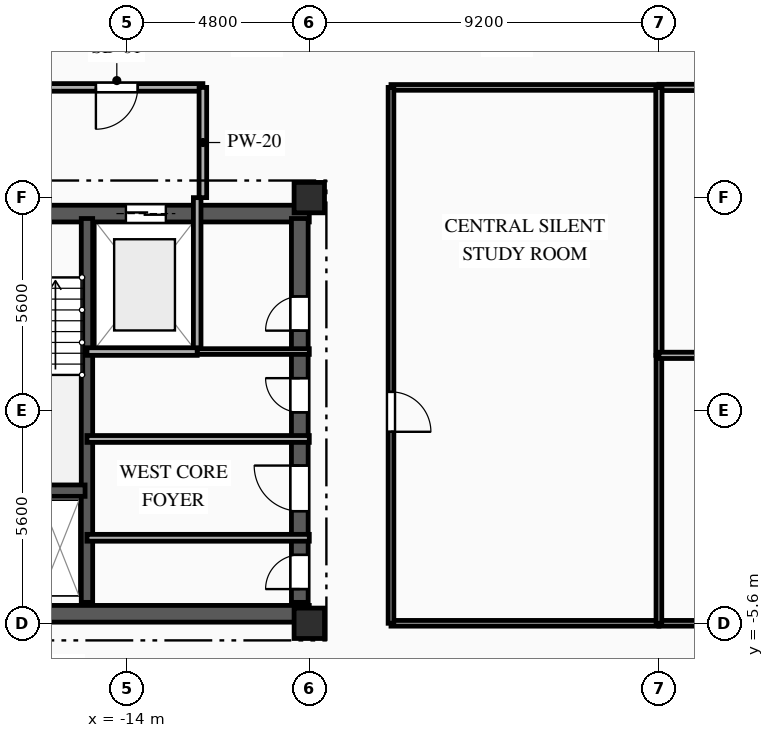
"""IFC4 building model, lengths in metres.
Left out: names, types, materials, properties, quantities, classifications, styles, units other than length and angle.
Written with IfcOpenShell. Run it as: python <this file> out.ifc"""

import sys

from ifc_helpers import new_model, si_unit, direction, frame, frame_2d, origin, origin_2d, place, context, subcontext, project, spatial, rectangle, extrude, element, fill, save


model = new_model("IFC4")
c1 = context("Model", 3, precision=1e-05, world=origin(), true_north=direction((0.0, 1.0)))
c2 = subcontext(c1, "Body", "Model", "MODEL_VIEW")
j1 = project(units=[si_unit("LENGTHUNIT", "METRE"), si_unit("PLANEANGLEUNIT", "RADIAN")], contexts=[c1])
p1 = place(None, origin())
s1 = spatial("IfcSite", under=j1, at=p1, CompositionType="ELEMENT")
p2 = place(p1, origin())
s2 = spatial("IfcBuilding", under=s1, at=p2, CompositionType="ELEMENT")
p3 = place(p2, frame((0.0, 0.0, 241.7)))
s3 = spatial("IfcBuildingStorey", under=s2, at=p3, CompositionType="ELEMENT", Elevation=241.7)
for number, where, z_axis, x_axis in (
    (1, (-9.2, -5.6, 0.0), (0.0, 0.0, 1.0), (1.0, 0.0, 0.0)),
    (2, (-9.2, 5.6, 0.0), (0.0, 0.0, 1.0), (1.0, 0.0, 0.0)),
):
    element("IfcColumn", number, at=place(p3, frame(where, z_axis=z_axis, x_axis=x_axis)), inside=s3, PredefinedType="COLUMN", context=c2, shape_type="SweptSolid", body=[
        extrude(rectangle(XDim=0.8, YDim=0.8, at=origin_2d()), origin(), (0.0, 0.0, 1.0), 3.35),
    ])
p4 = place(p3, frame((-18.8, 5.18, 0.0), z_axis=(0.0, 0.0, 1.0), x_axis=(1.0, 0.0, 0.0)))
e3 = element("IfcWall", 3, at=p4, inside=s3, PredefinedType="SHEAR", context=c2, shape_type="SweptSolid", body=[
    extrude(rectangle(XDim=9.6, YDim=0.44, at=frame_2d((4.8, 0.0))), origin(), (0.0, 0.0, 1.0), 3.04),
])
p5 = place(p4, frame((1.55, 0.0, 0.0)))
e4 = element("IfcOpeningElement", 4, at=p5, cuts=e3, PredefinedType="OPENING", context=c2, shape_type="SweptSolid", body=[
    extrude(rectangle(XDim=1.1, YDim=2.15, at=frame_2d((0.55, 1.075))), frame((0.0, 0.23, 0.0), z_axis=(0.0, -1.0, 0.0), x_axis=(1.0, 0.0, 0.0)), (0.0, 0.0, 1.0), 0.46),
])
p6 = place(p4, frame((4.775, 0.0, 0.0)))
e5 = element("IfcOpeningElement", 5, at=p6, cuts=e3, PredefinedType="OPENING", context=c2, shape_type="SweptSolid", body=[
    extrude(rectangle(XDim=1.05, YDim=2.1, at=frame_2d((0.525, 1.05))), frame((0.0, 0.23, 0.0), z_axis=(0.0, -1.0, 0.0), x_axis=(1.0, 0.0, 0.0)), (0.0, 0.0, 1.0), 0.46),
])
p7 = place(p3, frame((-18.8, -5.35, 0.0), z_axis=(0.0, 0.0, 1.0), x_axis=(1.0, 0.0, 0.0)))
e6 = element("IfcWall", 6, at=p7, inside=s3, PredefinedType="SHEAR", context=c2, shape_type="SweptSolid", body=[
    extrude(rectangle(XDim=9.6, YDim=0.44, at=frame_2d((4.8, 0.0))), origin(), (0.0, 0.0, 1.0), 3.04),
])
p8 = place(p7, frame((1.05, 0.0, 0.0)))
e7 = element("IfcOpeningElement", 7, at=p8, cuts=e6, PredefinedType="OPENING", context=c2, shape_type="SweptSolid", body=[
    extrude(rectangle(XDim=0.9, YDim=2.1, at=frame_2d((0.45, 1.05))), frame((0.0, 0.23, 0.0), z_axis=(0.0, -1.0, 0.0), x_axis=(1.0, 0.0, 0.0)), (0.0, 0.0, 1.0), 0.46),
])
p9 = place(p3, frame((-9.45, -5.05, 0.0), z_axis=(0.0, 0.0, 1.0), x_axis=(0.0, 1.0, 0.0)))
e8 = element("IfcWall", 8, at=p9, inside=s3, PredefinedType="SHEAR", context=c2, shape_type="SweptSolid", body=[
    extrude(rectangle(XDim=10.1, YDim=0.44, at=frame_2d((5.05, 0.0))), origin(), (0.0, 0.0, 1.0), 3.04),
])
p10 = place(p9, frame((7.15, 0.0, 0.0)))
e9 = element("IfcOpeningElement", 9, at=p10, cuts=e8, PredefinedType="OPENING", context=c2, shape_type="SweptSolid", body=[
    extrude(rectangle(XDim=0.9, YDim=2.1, at=frame_2d((0.45, 1.05))), frame((0.0, 0.23, 0.0), z_axis=(0.0, -1.0, 0.0), x_axis=(1.0, 0.0, 0.0)), (0.0, 0.0, 1.0), 0.46),
])
p11 = place(p9, frame((2.4, 0.0, 0.0)))
e10 = element("IfcOpeningElement", 10, at=p11, cuts=e8, PredefinedType="OPENING", context=c2, shape_type="SweptSolid", body=[
    extrude(rectangle(XDim=1.2, YDim=2.15, at=frame_2d((0.6, 1.075))), frame((0.0, 0.23, 0.0), z_axis=(0.0, -1.0, 0.0), x_axis=(1.0, 0.0, 0.0)), (0.0, 0.0, 1.0), 0.46),
])
p12 = place(p9, frame((0.35, 0.0, 0.0)))
e11 = element("IfcOpeningElement", 11, at=p12, cuts=e8, PredefinedType="OPENING", context=c2, shape_type="SweptSolid", body=[
    extrude(rectangle(XDim=0.9, YDim=2.1, at=frame_2d((0.45, 1.05))), frame((0.0, 0.23, 0.0), z_axis=(0.0, -1.0, 0.0), x_axis=(1.0, 0.0, 0.0)), (0.0, 0.0, 1.0), 0.46),
])
p13 = place(p9, frame((5.0, 0.0, 0.0)))
e12 = element("IfcOpeningElement", 12, at=p13, cuts=e8, PredefinedType="OPENING", context=c2, shape_type="SweptSolid", body=[
    extrude(rectangle(XDim=0.9, YDim=2.1, at=frame_2d((0.45, 1.05))), frame((0.0, 0.23, 0.0), z_axis=(0.0, -1.0, 0.0), x_axis=(1.0, 0.0, 0.0)), (0.0, 0.0, 1.0), 0.46),
])
p14 = place(p3, frame((-15.05, -5.05, 0.0), z_axis=(0.0, 0.0, 1.0), x_axis=(0.0, 1.0, 0.0)))
e13 = element("IfcWall", 13, at=p14, inside=s3, PredefinedType="SHEAR", context=c2, shape_type="SweptSolid", body=[
    extrude(rectangle(XDim=10.1, YDim=0.3, at=frame_2d((5.05, 0.0))), origin(), (0.0, 0.0, 1.0), 3.04),
])
p15 = place(p3, frame((-18.28, -2.11, 0.0), z_axis=(0.0, 0.0, 1.0), x_axis=(1.0, 0.0, 0.0)))
e14 = element("IfcWall", 14, at=p15, inside=s3, PredefinedType="SHEAR", context=c2, shape_type="SweptSolid", body=[
    extrude(rectangle(XDim=3.18, YDim=0.3, at=frame_2d((1.59, 0.0))), origin(), (0.0, 0.0, 1.0), 3.04),
])
p16 = place(p3, frame((-12.15, 1.55, 0.0), z_axis=(0.0, 0.0, 1.0), x_axis=(0.0, 1.0, 0.0)))
e15 = element("IfcWall", 15, at=p16, inside=s3, PredefinedType="PARTITIONING", context=c2, shape_type="SweptSolid", body=[
    extrude(rectangle(XDim=4.05, YDim=0.2, at=frame_2d((2.025, 0.0))), origin(), (0.0, 0.0, 1.0), 3.04),
])
p17 = place(p3, frame((-12.0, 8.5, 0.0), z_axis=(0.0, 0.0, 1.0), x_axis=(-1.0, 0.0, 0.0)))
e16 = element("IfcWall", 16, at=p17, inside=s3, PredefinedType="PARTITIONING", context=c2, shape_type="SweptSolid", body=[
    extrude(rectangle(XDim=6.8, YDim=0.2, at=frame_2d((3.4, 0.0))), origin(), (0.0, 0.0, 1.0), 3.04),
])
p18 = place(p17, frame((1.715, 0.0, 0.0)))
e17 = element("IfcOpeningElement", 17, at=p18, cuts=e16, PredefinedType="OPENING", context=c2, shape_type="SweptSolid", body=[
    extrude(rectangle(XDim=1.1, YDim=2.15, at=frame_2d((0.55, 1.075))), frame((0.0, 0.11, 0.0), z_axis=(0.0, -1.0, 0.0), x_axis=(1.0, 0.0, 0.0)), (0.0, 0.0, 1.0), 0.22),
])
p19 = place(p3, frame((-12.0, 5.6, 0.0), z_axis=(0.0, 0.0, 1.0), x_axis=(0.0, 1.0, 0.0)))
e18 = element("IfcWall", 18, at=p19, inside=s3, PredefinedType="PARTITIONING", context=c2, shape_type="SweptSolid", body=[
    extrude(rectangle(XDim=2.9, YDim=0.2, at=frame_2d((1.45, 0.0))), origin(), (0.0, 0.0, 1.0), 3.04),
])
p20 = place(p3, frame((-12.15, 1.55, 0.0), z_axis=(0.0, 0.0, 1.0), x_axis=(1.0, 0.0, 0.0)))
e19 = element("IfcWall", 19, at=p20, inside=s3, PredefinedType="PARTITIONING", context=c2, shape_type="SweptSolid", body=[
    extrude(rectangle(XDim=2.95, YDim=0.15, at=frame_2d((1.475, 0.0))), origin(), (0.0, 0.0, 1.0), 3.04),
])
p21 = place(p3, frame((-15.05, -3.35, 0.0), z_axis=(0.0, 0.0, 1.0), x_axis=(1.0, 0.0, 0.0)))
e20 = element("IfcWall", 20, at=p21, inside=s3, PredefinedType="PARTITIONING", context=c2, shape_type="SweptSolid", body=[
    extrude(rectangle(XDim=5.85, YDim=0.18, at=frame_2d((2.925, 0.0))), origin(), (0.0, 0.0, 1.0), 2.755),
])
p22 = place(p3, frame((-9.2, -0.75, 0.0), z_axis=(0.0, 0.0, 1.0), x_axis=(-1.0, 0.0, 0.0)))
e21 = element("IfcWall", 21, at=p22, inside=s3, PredefinedType="PARTITIONING", context=c2, shape_type="SweptSolid", body=[
    extrude(rectangle(XDim=5.85, YDim=0.18, at=frame_2d((2.925, 0.0))), origin(), (0.0, 0.0, 1.0), 3.04),
])
p23 = place(p3, frame((0.0, 8.5, 0.0), z_axis=(0.0, 0.0, 1.0), x_axis=(-1.0, 0.0, 0.0)))
e22 = element("IfcWall", 22, at=p23, inside=s3, PredefinedType="PARTITIONING", context=c2, shape_type="SweptSolid", body=[
    extrude(rectangle(XDim=7.05, YDim=0.15, at=frame_2d((3.525, 0.0))), origin(), (0.0, 0.0, 1.0), 3.04),
])
p24 = place(p3, frame((7.05, 8.5, 0.0), z_axis=(0.0, 0.0, 1.0), x_axis=(-1.0, 0.0, 0.0)))
e23 = element("IfcWall", 23, at=p24, inside=s3, PredefinedType="PARTITIONING", context=c2, shape_type="SweptSolid", body=[
    extrude(rectangle(XDim=7.05, YDim=0.165, at=frame_2d((3.525, 0.0))), origin(), (0.0, 0.0, 1.0), 3.04),
])
p25 = place(p24, frame((3.542, 0.0, 0.0)))
e24 = element("IfcOpeningElement", 24, at=p25, cuts=e23, PredefinedType="OPENING", context=c2, shape_type="SweptSolid", body=[
    extrude(rectangle(XDim=1.15, YDim=2.15, at=frame_2d((0.575, 1.075))), frame((0.0, 0.093, 0.0), z_axis=(0.0, -1.0, 0.0), x_axis=(1.0, 0.0, 0.0)), (0.0, 0.0, 1.0), 0.185),
])
p26 = place(p3, frame((-7.05, -5.6, 0.0), z_axis=(0.0, 0.0, 1.0), x_axis=(1.0, 0.0, 0.0)))
e25 = element("IfcWall", 25, at=p26, inside=s3, PredefinedType="PARTITIONING", context=c2, shape_type="SweptSolid", body=[
    extrude(rectangle(XDim=7.05, YDim=0.15, at=frame_2d((3.525, 0.0))), origin(), (0.0, 0.0, 1.0), 2.525),
])
p27 = place(p3, frame((0.0, -5.6, 0.0), z_axis=(0.0, 0.0, 1.0), x_axis=(1.0, 0.0, 0.0)))
e26 = element("IfcWall", 26, at=p27, inside=s3, PredefinedType="PARTITIONING", context=c2, shape_type="SweptSolid", body=[
    extrude(rectangle(XDim=7.05, YDim=0.15, at=frame_2d((3.525, 0.0))), origin(), (0.0, 0.0, 1.0), 2.525),
])
p28 = place(p27, frame((1.185, 0.0, 0.0)))
e27 = element("IfcOpeningElement", 27, at=p28, cuts=e26, PredefinedType="OPENING", context=c2, shape_type="SweptSolid", body=[
    extrude(rectangle(XDim=1.05, YDim=2.15, at=frame_2d((0.525, 1.075))), frame((0.0, 0.085, 0.0), z_axis=(0.0, -1.0, 0.0), x_axis=(1.0, 0.0, 0.0)), (0.0, 0.0, 1.0), 0.17),
])
p29 = place(p3, frame((-7.05, 8.5, 0.0), z_axis=(0.0, 0.0, 1.0), x_axis=(0.0, -1.0, 0.0)))
e28 = element("IfcWall", 28, at=p29, inside=s3, PredefinedType="PARTITIONING", context=c2, shape_type="SweptSolid", body=[
    extrude(rectangle(XDim=14.1, YDim=0.15, at=frame_2d((7.05, 0.0))), origin(), (0.0, 0.0, 1.0), 3.04),
])
p30 = place(p29, frame((8.011, 0.0, 0.0)))
e29 = element("IfcOpeningElement", 29, at=p30, cuts=e28, PredefinedType="OPENING", context=c2, shape_type="SweptSolid", body=[
    extrude(rectangle(XDim=1.05, YDim=2.15, at=frame_2d((0.525, 1.075))), frame((0.0, 0.085, 0.0), z_axis=(0.0, -1.0, 0.0), x_axis=(1.0, 0.0, 0.0)), (0.0, 0.0, 1.0), 0.17),
])
p31 = place(p3, frame((0.0, 1.45, 0.0), z_axis=(0.0, 0.0, 1.0), x_axis=(0.0, -1.0, 0.0)))
e30 = element("IfcWall", 30, at=p31, inside=s3, PredefinedType="PARTITIONING", context=c2, shape_type="SweptSolid", body=[
    extrude(rectangle(XDim=7.05, YDim=0.15, at=frame_2d((3.525, 0.0))), origin(), (0.0, 0.0, 1.0), 3.04),
])
for number, where, z_axis, x_axis in (
    (31, (0.0, 8.5, 0.0), (0.0, 0.0, 1.0), (0.0, -1.0, 0.0)),
    (32, (0.0, 1.45, 0.0), (0.0, 0.0, 1.0), (1.0, 0.0, 0.0)),
):
    element("IfcWall", number, at=place(p3, frame(where, z_axis=z_axis, x_axis=x_axis)), inside=s3, PredefinedType="PARTITIONING", context=c2, shape_type="SweptSolid", body=[
        extrude(rectangle(XDim=7.05, YDim=0.165, at=frame_2d((3.525, 0.0))), origin(), (0.0, 0.0, 1.0), 3.04),
    ])
p32 = place(p3, frame((-15.05, 1.55, 0.0), z_axis=(0.0, 0.0, 1.0), x_axis=(1.0, 0.0, 0.0)))
e33 = element("IfcWall", 33, at=p32, inside=s3, PredefinedType="PARTITIONING", context=c2, shape_type="SweptSolid", body=[
    extrude(rectangle(XDim=2.9, YDim=0.2, at=frame_2d((1.45, 0.0))), origin(), (0.0, 0.0, 1.0), 3.04),
])
p33 = place(p6, origin())
e34 = element("IfcDoor", 34, at=p33, inside=s3, OperationType="DOUBLE_DOOR_SLIDING", PredefinedType="DOOR", context=c2, shape_type="SweptSolid", body=[
    extrude(rectangle(XDim=1.05, YDim=2.1, at=frame_2d((0.525, 1.05))), frame((0.0, 0.025, 0.0), z_axis=(0.0, -1.0, 0.0), x_axis=(1.0, 0.0, 0.0)), (0.0, 0.0, 1.0), 0.05),
])
fill(e5, e34)
p34 = place(p18, origin())
e35 = element("IfcDoor", 35, at=p34, inside=s3, OperationType="SINGLE_SWING_RIGHT", PredefinedType="DOOR", context=c2, shape_type="SweptSolid", body=[
    extrude(rectangle(XDim=1.1, YDim=2.15, at=frame_2d((0.55, 1.075))), frame((0.0, 0.025, 0.0), z_axis=(0.0, -1.0, 0.0), x_axis=(1.0, 0.0, 0.0)), (0.0, 0.0, 1.0), 0.05),
])
fill(e17, e35)
p35 = place(p10, origin())
e36 = element("IfcDoor", 36, at=p35, inside=s3, OperationType="SINGLE_SWING_LEFT", PredefinedType="DOOR", context=c2, shape_type="SweptSolid", body=[
    extrude(rectangle(XDim=0.9, YDim=2.1, at=frame_2d((0.45, 1.05))), frame((0.0, 0.025, 0.0), z_axis=(0.0, -1.0, 0.0), x_axis=(1.0, 0.0, 0.0)), (0.0, 0.0, 1.0), 0.05),
])
fill(e9, e36)
p36 = place(p11, origin())
e37 = element("IfcDoor", 37, at=p36, inside=s3, OperationType="SINGLE_SWING_RIGHT", PredefinedType="DOOR", context=c2, shape_type="SweptSolid", body=[
    extrude(rectangle(XDim=1.2, YDim=2.15, at=frame_2d((0.6, 1.075))), frame((0.0, 0.025, 0.0), z_axis=(0.0, -1.0, 0.0), x_axis=(1.0, 0.0, 0.0)), (0.0, 0.0, 1.0), 0.05),
])
fill(e10, e37)
p37 = place(p12, origin())
e38 = element("IfcDoor", 38, at=p37, inside=s3, OperationType="SINGLE_SWING_LEFT", PredefinedType="DOOR", context=c2, shape_type="SweptSolid", body=[
    extrude(rectangle(XDim=0.9, YDim=2.1, at=frame_2d((0.45, 1.05))), frame((0.0, 0.025, 0.0), z_axis=(0.0, -1.0, 0.0), x_axis=(1.0, 0.0, 0.0)), (0.0, 0.0, 1.0), 0.05),
])
fill(e11, e38)
p38 = place(p13, origin())
e39 = element("IfcDoor", 39, at=p38, inside=s3, OperationType="SINGLE_SWING_RIGHT", PredefinedType="DOOR", context=c2, shape_type="SweptSolid", body=[
    extrude(rectangle(XDim=0.9, YDim=2.1, at=frame_2d((0.45, 1.05))), frame((0.0, 0.025, 0.0), z_axis=(0.0, -1.0, 0.0), x_axis=(1.0, 0.0, 0.0)), (0.0, 0.0, 1.0), 0.05),
])
fill(e12, e39)
p39 = place(p30, origin())
e40 = element("IfcDoor", 40, at=p39, inside=s3, OperationType="SINGLE_SWING_RIGHT", PredefinedType="DOOR", context=c2, shape_type="SweptSolid", body=[
    extrude(rectangle(XDim=1.05, YDim=2.15, at=frame_2d((0.525, 1.075))), frame((0.0, 0.025, 0.0), z_axis=(0.0, -1.0, 0.0), x_axis=(1.0, 0.0, 0.0)), (0.0, 0.0, 1.0), 0.05),
])
fill(e29, e40)
save(model, sys.argv[1])
